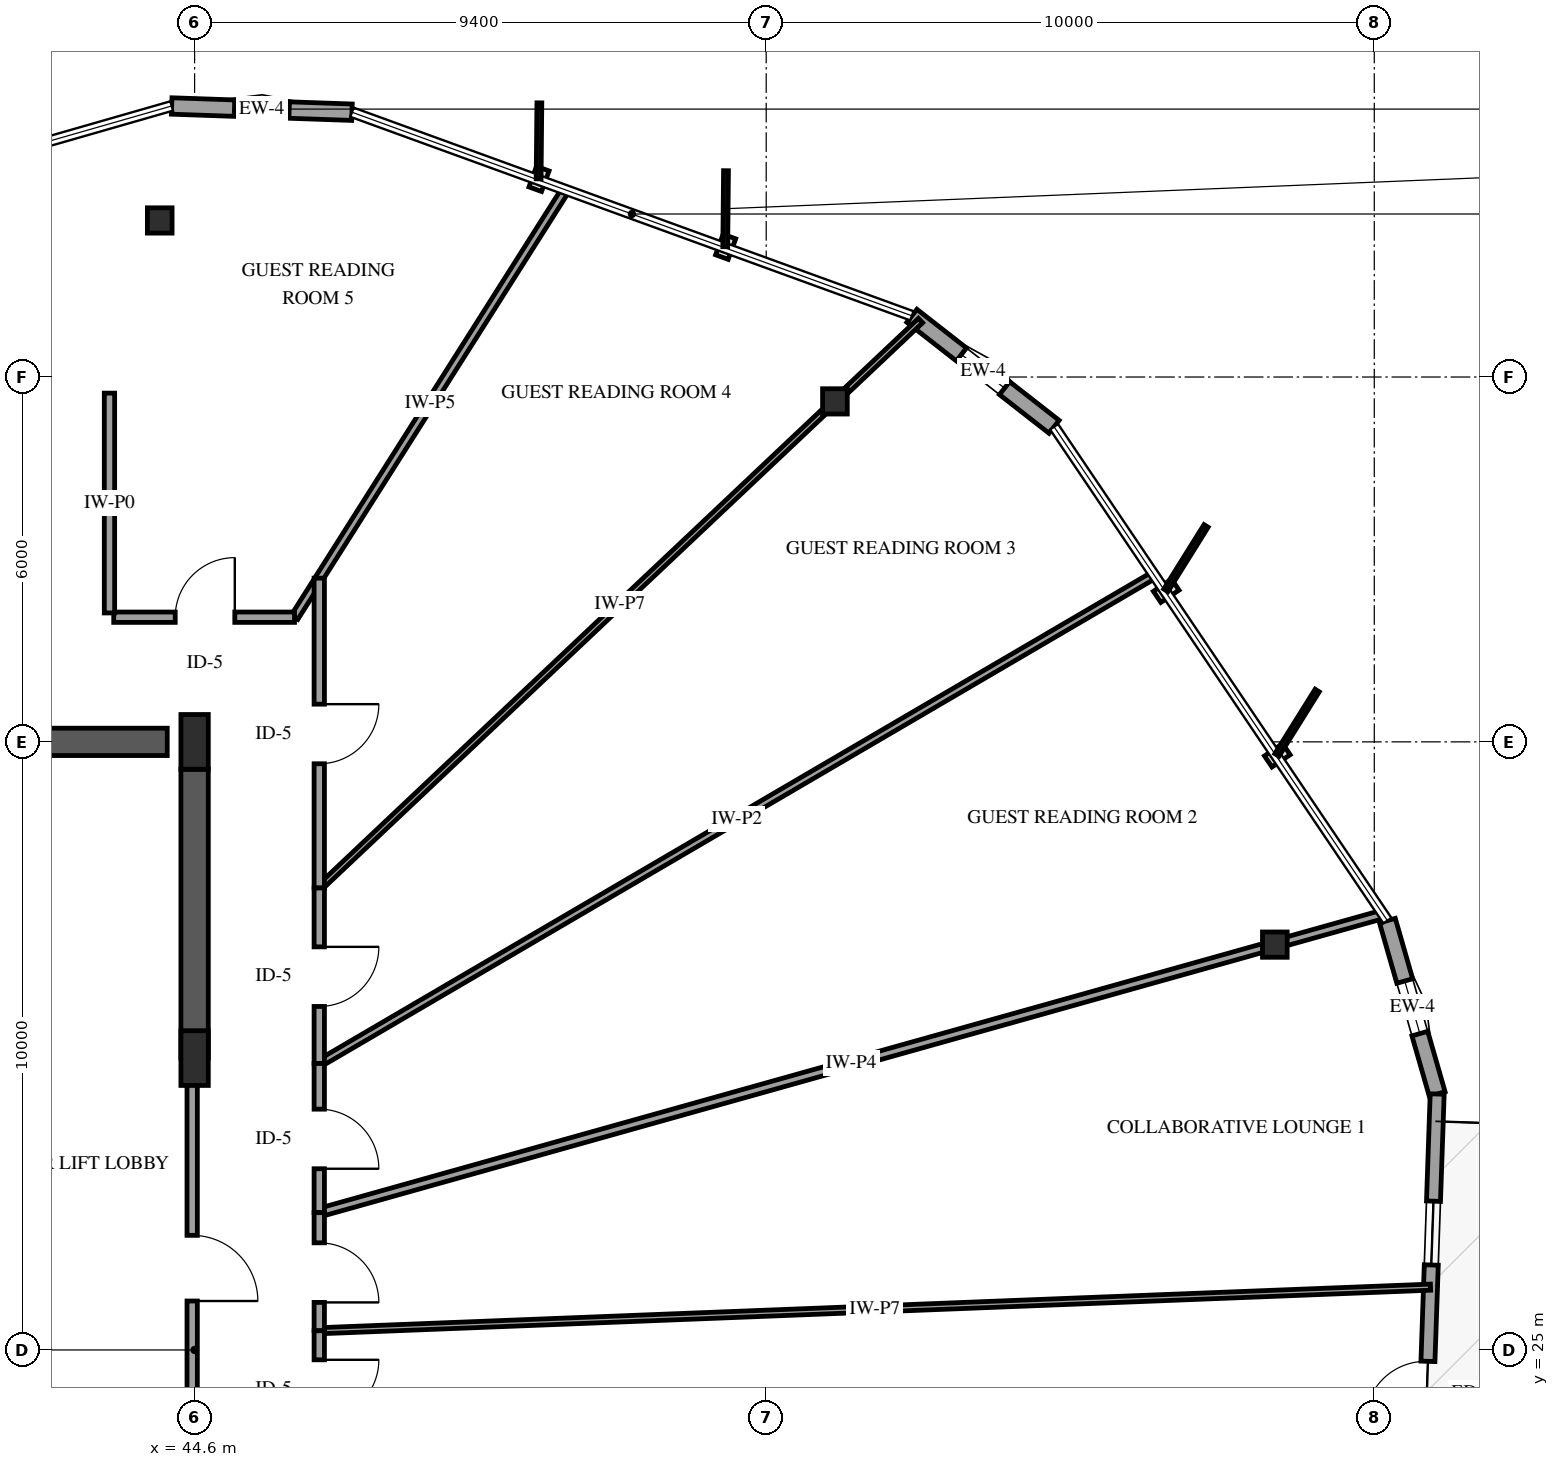
"""IFC4 building model, lengths in metres.
Left out: names, types, materials, properties, quantities, classifications, styles, units other than length and angle.
Written with IfcOpenShell. Run it as: python <this file> out.ifc"""

import sys

from ifc_helpers import new_model, si_unit, direction, frame, frame_2d, origin, origin_2d, place, context, subcontext, project, spatial, rectangle, i_section, extrude, element, fill, save


model = new_model("IFC4")
c1 = context("Model", 3, precision=1e-05, world=origin(), true_north=direction((0.0, 1.0)))
c2 = subcontext(c1, "Body", "Model", "MODEL_VIEW")
j1 = project(units=[si_unit("LENGTHUNIT", "METRE"), si_unit("PLANEANGLEUNIT", "RADIAN")], contexts=[c1])
p1 = place(None, origin())
s1 = spatial("IfcSite", under=j1, at=p1, CompositionType="ELEMENT")
p2 = place(p1, origin())
s2 = spatial("IfcBuilding", under=s1, at=p2, CompositionType="ELEMENT")
p3 = place(p2, frame((0.0, 0.0, 223.0)))
s3 = spatial("IfcBuildingStorey", under=s2, at=p3, CompositionType="ELEMENT", Elevation=223.0)
p4 = place(p3, frame((41.3, 35.0, 0.0), z_axis=(0.0, 0.0, 1.0), x_axis=(1.0, 0.0, 0.0)))
e1 = element("IfcWall", 1, at=p4, inside=s3, PredefinedType="SHEAR", context=c2, shape_type="SweptSolid", body=[
    extrude(rectangle(XDim=2.85, YDim=0.45, at=frame_2d((1.425, 0.0))), origin(), (0.0, 0.0, 1.0), 3.6),
])
p5 = place(p3, frame((44.6, 29.8, 0.0), z_axis=(0.0, 0.0, 1.0), x_axis=(0.0, 1.0, 0.0)))
e2 = element("IfcWall", 2, at=p5, inside=s3, PredefinedType="SHEAR", context=c2, shape_type="SweptSolid", body=[
    extrude(rectangle(XDim=4.75, YDim=0.45, at=frame_2d((2.375, 0.0))), origin(), (0.0, 0.0, 1.0), 3.6),
])
for number, where, z_axis, x_axis in (
    (3, (44.6, 29.8, 0.0), (0.0, 0.0, 1.0), (1.0, 0.0, 0.0)),
    (4, (44.6, 35.0, 0.0), (0.0, 0.0, 1.0), (1.0, 0.0, 0.0)),
):
    element("IfcColumn", number, at=place(p3, frame(where, z_axis=z_axis, x_axis=x_axis)), inside=s3, PredefinedType="PILASTER", context=c2, shape_type="SweptSolid", body=[
        extrude(rectangle(XDim=0.45, YDim=0.9, at=origin_2d()), origin(), (0.0, 0.0, 1.0), 3.6),
    ])
for number, where, z_axis, x_axis in (
    (5, (62.365, 31.666, 0.0), (0.0, 0.0, 1.0), (1.0, 0.0, 0.0)),
    (6, (55.13, 40.599, 0.0), (0.0, 0.0, 1.0), (1.0, 0.0, 0.0)),
    (7, (44.027, 43.574, 0.0), (0.0, 0.0, 1.0), (1.0, 0.0, 0.0)),
):
    element("IfcColumn", number, at=place(p3, frame(where, z_axis=z_axis, x_axis=x_axis)), inside=s3, PredefinedType="COLUMN", context=c2, shape_type="SweptSolid", body=[
        extrude(i_section(OverallWidth=0.406, OverallDepth=0.416, WebThickness=0.03, FlangeThickness=0.048, FilletRadius=0.038, at=origin_2d()), origin(), (0.0, 0.0, 1.0), 3.6),
    ])
p6 = place(p3, frame((47.188, 45.354, 0.0), z_axis=(0.0, 0.0, 1.0), x_axis=(-0.999402475551, 0.034564314866, 0.0)))
e8 = element("IfcWall", 8, at=p6, inside=s3, PredefinedType="SOLIDWALL", context=c2, shape_type="SweptSolid", body=[
    extrude(rectangle(XDim=2.967, YDim=0.27, at=frame_2d((1.483, 0.0))), origin(), (0.0, 0.0, 1.0), 2.679),
])
p7 = place(p6, frame((1.033, 0.0, 0.75)))
e9 = element("IfcOpeningElement", 9, at=p7, cuts=e8, PredefinedType="OPENING", context=c2, shape_type="SweptSolid", body=[
    extrude(rectangle(XDim=0.9, YDim=1.5, at=frame_2d((0.45, 0.75))), frame((0.0, 0.145, 0.0), z_axis=(0.0, -1.0, 0.0), x_axis=(1.0, 0.0, 0.0)), (0.0, 0.0, 1.0), 0.29),
])
p8 = place(p3, frame((65.034, 29.209, 0.0), z_axis=(0.0, 0.0, 1.0), x_axis=(-0.275927353379, 0.961178493131, 0.0)))
e10 = element("IfcWall", 10, at=p8, inside=s3, PredefinedType="SOLIDWALL", context=c2, shape_type="SweptSolid", body=[
    extrude(rectangle(XDim=2.967, YDim=0.27, at=frame_2d((1.483, 0.0))), origin(), (0.0, 0.0, 1.0), 2.679),
])
p9 = place(p8, frame((1.033, 0.0, 0.75)))
e11 = element("IfcOpeningElement", 11, at=p9, cuts=e10, PredefinedType="OPENING", context=c2, shape_type="SweptSolid", body=[
    extrude(rectangle(XDim=0.9, YDim=1.5, at=frame_2d((0.45, 0.75))), frame((0.0, 0.145, 0.0), z_axis=(0.0, -1.0, 0.0), x_axis=(1.0, 0.0, 0.0)), (0.0, 0.0, 1.0), 0.29),
])
p10 = place(p3, frame((64.696, 19.417, 0.0), z_axis=(0.0, 0.0, 1.0), x_axis=(0.034536942247, 0.999403421857, 0.0)))
e12 = element("IfcWall", 12, at=p10, inside=s3, PredefinedType="SOLIDWALL", context=c2, shape_type="SweptSolid", body=[
    extrude(rectangle(XDim=9.798, YDim=0.23, at=frame_2d((4.899, 0.0))), origin(), (0.0, 0.0, 1.0), 2.679),
])
p11 = place(p10, frame((4.399, 0.0, 0.0)))
e13 = element("IfcOpeningElement", 13, at=p11, cuts=e12, PredefinedType="OPENING", context=c2, shape_type="SweptSolid", body=[
    extrude(rectangle(XDim=1.0, YDim=2.15, at=frame_2d((0.5, 1.075))), frame((0.0, 0.125, 0.0), z_axis=(0.0, -1.0, 0.0), x_axis=(1.0, 0.0, 0.0)), (0.0, 0.0, 1.0), 0.25),
])
p12 = place(p10, frame((0.818, 0.0, 0.72)))
e14 = element("IfcOpeningElement", 14, at=p12, cuts=e12, PredefinedType="OPENING", context=c2, shape_type="SweptSolid", body=[
    extrude(rectangle(XDim=1.05, YDim=1.55, at=frame_2d((0.525, 0.775))), frame((0.0, 0.125, 0.0), z_axis=(0.0, -1.0, 0.0), x_axis=(1.0, 0.0, 0.0)), (0.0, 0.0, 1.0), 0.25),
])
p13 = place(p10, frame((6.984, 0.0, 0.72)))
e15 = element("IfcOpeningElement", 15, at=p13, cuts=e12, PredefinedType="OPENING", context=c2, shape_type="SweptSolid", body=[
    extrude(rectangle(XDim=1.05, YDim=1.55, at=frame_2d((0.525, 0.775))), frame((0.0, 0.125, 0.0), z_axis=(0.0, -1.0, 0.0), x_axis=(1.0, 0.0, 0.0)), (0.0, 0.0, 1.0), 0.25),
])
p14 = place(p3, frame((58.734, 40.181, 0.0), z_axis=(0.0, 0.0, 1.0), x_axis=(-0.788216472233, 0.615398076776, 0.0)))
e16 = element("IfcWall", 16, at=p14, inside=s3, PredefinedType="SOLIDWALL", context=c2, shape_type="SweptSolid", body=[
    extrude(rectangle(XDim=2.967, YDim=0.27, at=frame_2d((1.483, 0.0))), origin(), (0.0, 0.0, 1.0), 2.679),
])
p15 = place(p14, frame((1.033, 0.0, 0.75)))
e17 = element("IfcOpeningElement", 17, at=p15, cuts=e16, PredefinedType="OPENING", context=c2, shape_type="SweptSolid", body=[
    extrude(rectangle(XDim=0.9, YDim=1.5, at=frame_2d((0.45, 0.75))), frame((0.0, 0.145, 0.0), z_axis=(0.0, -1.0, 0.0), x_axis=(1.0, 0.0, 0.0)), (0.0, 0.0, 1.0), 0.29),
])
p16 = place(p3, frame((64.925, 26.033, 0.0), z_axis=(0.0, 0.0, 1.0), x_axis=(-0.999231161381, -0.039205689947, 0.0)))
e18 = element("IfcWall", 18, at=p16, inside=s3, PredefinedType="PARTITIONING", context=c2, shape_type="SweptSolid", body=[
    extrude(rectangle(XDim=18.289, YDim=0.1, at=frame_2d((9.145, 0.0))), origin(), (0.0, 0.0, 1.0), 3.3),
])
p17 = place(p3, frame((46.65, 27.258, 0.0), z_axis=(0.0, 0.0, 1.0), x_axis=(0.962844613564, 0.27005601295, 0.0)))
e19 = element("IfcWall", 19, at=p17, inside=s3, PredefinedType="PARTITIONING", context=c2, shape_type="SweptSolid", body=[
    extrude(rectangle(XDim=18.17, YDim=0.14, at=frame_2d((9.085, 0.0))), origin(), (0.0, 0.0, 1.0), 3.3),
])
p18 = place(p3, frame((46.65, 29.711, 0.0), z_axis=(0.0, 0.0, 1.0), x_axis=(0.863111237198, 0.505013853496, 0.0)))
e20 = element("IfcWall", 20, at=p18, inside=s3, PredefinedType="PARTITIONING", context=c2, shape_type="SweptSolid", body=[
    extrude(rectangle(XDim=15.906, YDim=0.12, at=frame_2d((7.953, 0.0))), origin(), (0.0, 0.0, 1.0), 3.3),
])
p19 = place(p3, frame((46.65, 32.597, 0.0), z_axis=(0.0, 0.0, 1.0), x_axis=(0.727298938645, 0.686320809713, 0.0)))
e21 = element("IfcWall", 21, at=p19, inside=s3, PredefinedType="PARTITIONING", context=c2, shape_type="SweptSolid", body=[
    extrude(rectangle(XDim=13.596, YDim=0.1, at=frame_2d((6.798, 0.0))), origin(), (0.0, 0.0, 1.0), 2.595),
])
p20 = place(p3, frame((46.243, 37.05, 0.0), z_axis=(0.0, 0.0, 1.0), x_axis=(0.535488948364, 0.844542234693, 0.0)))
e22 = element("IfcWall", 22, at=p20, inside=s3, PredefinedType="PARTITIONING", context=c2, shape_type="SweptSolid", body=[
    extrude(rectangle(XDim=8.322, YDim=0.13, at=frame_2d((4.161, 0.0))), origin(), (0.0, 0.0, 1.0), 3.3),
])
p21 = place(p3, frame((44.56, 29.8, 0.0), z_axis=(0.0, 0.0, 1.0), x_axis=(0.0, -1.0, 0.0)))
e23 = element("IfcWall", 23, at=p21, inside=s3, PredefinedType="PARTITIONING", context=c2, shape_type="SweptSolid", body=[
    extrude(rectangle(XDim=6.91, YDim=0.17, at=frame_2d((3.455, 0.0))), origin(), (0.0, 0.0, 1.0), 2.34),
])
p22 = place(p21, frame((2.915, 0.0, 0.0)))
e24 = element("IfcOpeningElement", 24, at=p22, cuts=e23, PredefinedType="OPENING", context=c2, shape_type="SweptSolid", body=[
    extrude(rectangle(XDim=1.08, YDim=2.15, at=frame_2d((0.54, 1.075))), frame((0.0, 0.095, 0.0), z_axis=(0.0, -1.0, 0.0), x_axis=(1.0, 0.0, 0.0)), (0.0, 0.0, 1.0), 0.19),
])
p23 = place(p3, frame((46.65, 37.692, 0.0), z_axis=(0.0, 0.0, 1.0), x_axis=(0.0, -1.0, 0.0)))
e25 = element("IfcWall", 25, at=p23, inside=s3, PredefinedType="PARTITIONING", context=c2, shape_type="SweptSolid", body=[
    extrude(rectangle(XDim=5.095, YDim=0.17, at=frame_2d((2.547, 0.0))), origin(), (0.0, 0.0, 1.0), 3.3),
])
p24 = place(p23, frame((2.072, 0.0, 0.0)))
e26 = element("IfcOpeningElement", 26, at=p24, cuts=e25, PredefinedType="OPENING", context=c2, shape_type="SweptSolid", body=[
    extrude(rectangle(XDim=0.98, YDim=2.15, at=frame_2d((0.49, 1.075))), frame((0.0, 0.095, 0.0), z_axis=(0.0, -1.0, 0.0), x_axis=(1.0, 0.0, 0.0)), (0.0, 0.0, 1.0), 0.19),
])
p25 = place(p3, frame((43.27, 37.05, 0.0), z_axis=(0.0, 0.0, 1.0), x_axis=(1.0, 0.0, 0.0)))
e27 = element("IfcWall", 27, at=p25, inside=s3, PredefinedType="PARTITIONING", context=c2, shape_type="SweptSolid", body=[
    extrude(rectangle(XDim=2.973, YDim=0.17, at=frame_2d((1.486, 0.0))), origin(), (0.0, 0.0, 1.0), 3.3),
])
p26 = place(p25, frame((1.011, 0.0, 0.0)))
e28 = element("IfcOpeningElement", 28, at=p26, cuts=e27, PredefinedType="OPENING", context=c2, shape_type="SweptSolid", body=[
    extrude(rectangle(XDim=0.98, YDim=2.15, at=frame_2d((0.49, 1.075))), frame((0.0, 0.095, 0.0), z_axis=(0.0, -1.0, 0.0), x_axis=(1.0, 0.0, 0.0)), (0.0, 0.0, 1.0), 0.19),
])
p27 = place(p3, frame((46.65, 32.597, 0.0), z_axis=(0.0, 0.0, 1.0), x_axis=(0.0, -1.0, 0.0)))
e29 = element("IfcWall", 29, at=p27, inside=s3, PredefinedType="PARTITIONING", context=c2, shape_type="SweptSolid", body=[
    extrude(rectangle(XDim=2.886, YDim=0.17, at=frame_2d((1.443, 0.0))), origin(), (0.0, 0.0, 1.0), 3.3),
])
p28 = place(p27, frame((0.968, 0.0, 0.0)))
e30 = element("IfcOpeningElement", 30, at=p28, cuts=e29, PredefinedType="OPENING", context=c2, shape_type="SweptSolid", body=[
    extrude(rectangle(XDim=0.98, YDim=2.15, at=frame_2d((0.49, 1.075))), frame((0.0, 0.095, 0.0), z_axis=(0.0, -1.0, 0.0), x_axis=(1.0, 0.0, 0.0)), (0.0, 0.0, 1.0), 0.19),
])
p29 = place(p3, frame((46.65, 29.711, 0.0), z_axis=(0.0, 0.0, 1.0), x_axis=(0.0, -1.0, 0.0)))
e31 = element("IfcWall", 31, at=p29, inside=s3, PredefinedType="PARTITIONING", context=c2, shape_type="SweptSolid", body=[
    extrude(rectangle(XDim=2.453, YDim=0.17, at=frame_2d((1.227, 0.0))), origin(), (0.0, 0.0, 1.0), 3.3),
])
p30 = place(p29, frame((0.751, 0.0, 0.0)))
e32 = element("IfcOpeningElement", 32, at=p30, cuts=e31, PredefinedType="OPENING", context=c2, shape_type="SweptSolid", body=[
    extrude(rectangle(XDim=0.98, YDim=2.15, at=frame_2d((0.49, 1.075))), frame((0.0, 0.095, 0.0), z_axis=(0.0, -1.0, 0.0), x_axis=(1.0, 0.0, 0.0)), (0.0, 0.0, 1.0), 0.19),
])
p31 = place(p3, frame((46.65, 27.258, 0.0), z_axis=(0.0, 0.0, 1.0), x_axis=(0.0, -1.0, 0.0)))
e33 = element("IfcWall", 33, at=p31, inside=s3, PredefinedType="PARTITIONING", context=c2, shape_type="SweptSolid", body=[
    extrude(rectangle(XDim=1.942, YDim=0.17, at=frame_2d((0.971, 0.0))), origin(), (0.0, 0.0, 1.0), 3.3),
])
p32 = place(p31, frame((0.496, 0.0, 0.0)))
e34 = element("IfcOpeningElement", 34, at=p32, cuts=e33, PredefinedType="OPENING", context=c2, shape_type="SweptSolid", body=[
    extrude(rectangle(XDim=0.98, YDim=2.15, at=frame_2d((0.49, 1.075))), frame((0.0, 0.095, 0.0), z_axis=(0.0, -1.0, 0.0), x_axis=(1.0, 0.0, 0.0)), (0.0, 0.0, 1.0), 0.19),
])
p33 = place(p3, frame((46.65, 25.316, 0.0), z_axis=(0.0, 0.0, 1.0), x_axis=(0.0, -1.0, 0.0)))
e35 = element("IfcWall", 35, at=p33, inside=s3, PredefinedType="PARTITIONING", context=c2, shape_type="SweptSolid", body=[
    extrude(rectangle(XDim=1.906, YDim=0.17, at=frame_2d((0.953, 0.0))), origin(), (0.0, 0.0, 1.0), 3.3),
])
p34 = place(p33, frame((0.478, 0.0, 0.0)))
e36 = element("IfcOpeningElement", 36, at=p34, cuts=e35, PredefinedType="OPENING", context=c2, shape_type="SweptSolid", body=[
    extrude(rectangle(XDim=0.98, YDim=2.15, at=frame_2d((0.49, 1.075))), frame((0.0, 0.095, 0.0), z_axis=(0.0, -1.0, 0.0), x_axis=(1.0, 0.0, 0.0)), (0.0, 0.0, 1.0), 0.19),
])
p35 = place(p3, frame((43.2, 40.735, 0.0), z_axis=(0.0, 0.0, 1.0), x_axis=(0.0, -1.0, 0.0)))
e37 = element("IfcWall", 37, at=p35, inside=s3, PredefinedType="PARTITIONING", context=c2, shape_type="SweptSolid", body=[
    extrude(rectangle(XDim=3.615, YDim=0.17, at=frame_2d((1.808, 0.0))), origin(), (0.0, 0.0, 1.0), 2.595),
])
p36 = place(p7, origin())
e38 = element("IfcWindow", 38, at=p36, inside=s3, PartitioningType="SINGLE_PANEL", PredefinedType="WINDOW", context=c2, shape_type="SweptSolid", body=[
    extrude(rectangle(XDim=0.9, YDim=1.5, at=frame_2d((0.45, 0.75))), frame((0.0, 0.03, 0.0), z_axis=(0.0, -1.0, 0.0), x_axis=(1.0, 0.0, 0.0)), (0.0, 0.0, 1.0), 0.06),
])
fill(e9, e38)
p37 = place(p9, origin())
e39 = element("IfcWindow", 39, at=p37, inside=s3, PartitioningType="SINGLE_PANEL", PredefinedType="WINDOW", context=c2, shape_type="SweptSolid", body=[
    extrude(rectangle(XDim=0.9, YDim=1.5, at=frame_2d((0.45, 0.75))), frame((0.0, 0.03, 0.0), z_axis=(0.0, -1.0, 0.0), x_axis=(1.0, 0.0, 0.0)), (0.0, 0.0, 1.0), 0.06),
])
fill(e11, e39)
p38 = place(p11, origin())
e40 = element("IfcDoor", 40, at=p38, inside=s3, OperationType="SINGLE_SWING_LEFT", PredefinedType="DOOR", context=c2, shape_type="SweptSolid", body=[
    extrude(rectangle(XDim=1.0, YDim=2.15, at=frame_2d((0.5, 1.075))), frame((0.0, 0.025, 0.0), z_axis=(0.0, -1.0, 0.0), x_axis=(1.0, 0.0, 0.0)), (0.0, 0.0, 1.0), 0.05),
])
fill(e13, e40)
p39 = place(p13, origin())
e41 = element("IfcWindow", 41, at=p39, inside=s3, PartitioningType="SINGLE_PANEL", PredefinedType="WINDOW", context=c2, shape_type="SweptSolid", body=[
    extrude(rectangle(XDim=1.05, YDim=1.55, at=frame_2d((0.525, 0.775))), frame((0.0, 0.03, 0.0), z_axis=(0.0, -1.0, 0.0), x_axis=(1.0, 0.0, 0.0)), (0.0, 0.0, 1.0), 0.06),
])
fill(e15, e41)
p40 = place(p15, origin())
e42 = element("IfcWindow", 42, at=p40, inside=s3, PartitioningType="SINGLE_PANEL", PredefinedType="WINDOW", context=c2, shape_type="SweptSolid", body=[
    extrude(rectangle(XDim=0.9, YDim=1.5, at=frame_2d((0.45, 0.75))), frame((0.0, 0.03, 0.0), z_axis=(0.0, -1.0, 0.0), x_axis=(1.0, 0.0, 0.0)), (0.0, 0.0, 1.0), 0.06),
])
fill(e17, e42)
p41 = place(p22, origin())
e43 = element("IfcDoor", 43, at=p41, inside=s3, OperationType="SINGLE_SWING_RIGHT", PredefinedType="DOOR", context=c2, shape_type="SweptSolid", body=[
    extrude(rectangle(XDim=1.08, YDim=2.15, at=frame_2d((0.54, 1.075))), frame((0.0, 0.025, 0.0), z_axis=(0.0, -1.0, 0.0), x_axis=(1.0, 0.0, 0.0)), (0.0, 0.0, 1.0), 0.05),
])
fill(e24, e43)
p42 = place(p24, origin())
e44 = element("IfcDoor", 44, at=p42, inside=s3, OperationType="SINGLE_SWING_LEFT", PredefinedType="DOOR", context=c2, shape_type="SweptSolid", body=[
    extrude(rectangle(XDim=0.98, YDim=2.15, at=frame_2d((0.49, 1.075))), frame((0.0, 0.025, 0.0), z_axis=(0.0, -1.0, 0.0), x_axis=(1.0, 0.0, 0.0)), (0.0, 0.0, 1.0), 0.05),
])
fill(e26, e44)
p43 = place(p26, origin())
e45 = element("IfcDoor", 45, at=p43, inside=s3, OperationType="SINGLE_SWING_RIGHT", PredefinedType="DOOR", context=c2, shape_type="SweptSolid", body=[
    extrude(rectangle(XDim=0.98, YDim=2.15, at=frame_2d((0.49, 1.075))), frame((0.0, 0.025, 0.0), z_axis=(0.0, -1.0, 0.0), x_axis=(1.0, 0.0, 0.0)), (0.0, 0.0, 1.0), 0.05),
])
fill(e28, e45)
p44 = place(p28, origin())
e46 = element("IfcDoor", 46, at=p44, inside=s3, OperationType="SINGLE_SWING_LEFT", PredefinedType="DOOR", context=c2, shape_type="SweptSolid", body=[
    extrude(rectangle(XDim=0.98, YDim=2.15, at=frame_2d((0.49, 1.075))), frame((0.0, 0.025, 0.0), z_axis=(0.0, -1.0, 0.0), x_axis=(1.0, 0.0, 0.0)), (0.0, 0.0, 1.0), 0.05),
])
fill(e30, e46)
p45 = place(p30, origin())
e47 = element("IfcDoor", 47, at=p45, inside=s3, OperationType="SINGLE_SWING_RIGHT", PredefinedType="DOOR", context=c2, shape_type="SweptSolid", body=[
    extrude(rectangle(XDim=0.98, YDim=2.15, at=frame_2d((0.49, 1.075))), frame((0.0, 0.025, 0.0), z_axis=(0.0, -1.0, 0.0), x_axis=(1.0, 0.0, 0.0)), (0.0, 0.0, 1.0), 0.05),
])
fill(e32, e47)
p46 = place(p32, origin())
e48 = element("IfcDoor", 48, at=p46, inside=s3, OperationType="SINGLE_SWING_RIGHT", PredefinedType="DOOR", context=c2, shape_type="SweptSolid", body=[
    extrude(rectangle(XDim=0.98, YDim=2.15, at=frame_2d((0.49, 1.075))), frame((0.0, 0.025, 0.0), z_axis=(0.0, -1.0, 0.0), x_axis=(1.0, 0.0, 0.0)), (0.0, 0.0, 1.0), 0.05),
])
fill(e34, e48)
p47 = place(p34, origin())
e49 = element("IfcDoor", 49, at=p47, inside=s3, OperationType="SINGLE_SWING_LEFT", PredefinedType="DOOR", context=c2, shape_type="SweptSolid", body=[
    extrude(rectangle(XDim=0.98, YDim=2.15, at=frame_2d((0.49, 1.075))), frame((0.0, 0.025, 0.0), z_axis=(0.0, -1.0, 0.0), x_axis=(1.0, 0.0, 0.0)), (0.0, 0.0, 1.0), 0.05),
])
fill(e36, e49)
save(model, sys.argv[1])
